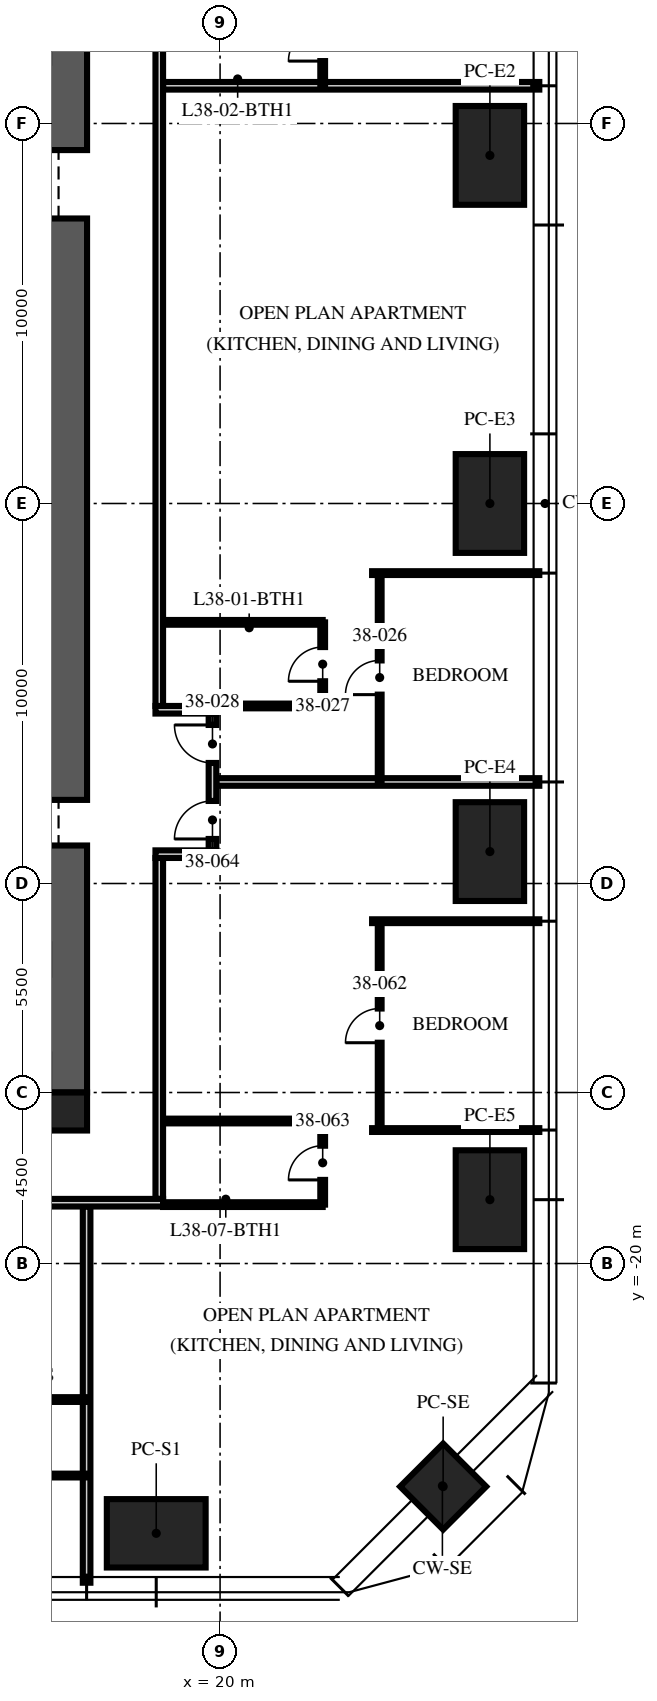
"""IFC4 building model, lengths in metres.
Left out: names, types, materials, properties, quantities, classifications, styles, units other than length and angle.
Written with IfcOpenShell. Run it as: python <this file> out.ifc"""

import sys

from ifc_helpers import new_model, si_unit, direction, frame, frame_2d, origin, origin_2d, place, context, subcontext, project, spatial, rectangle, extrude, element, fill, save


model = new_model("IFC4")
c1 = context("Model", 3, precision=1e-05, world=origin(), true_north=direction((0.0, 1.0)))
c2 = subcontext(c1, "Body", "Model", "MODEL_VIEW")
j1 = project(units=[si_unit("LENGTHUNIT", "METRE"), si_unit("PLANEANGLEUNIT", "RADIAN")], contexts=[c1])
p1 = place(None, origin())
s1 = spatial("IfcSite", under=j1, at=p1, CompositionType="ELEMENT")
p2 = place(p1, origin())
s2 = spatial("IfcBuilding", under=s1, at=p2, CompositionType="ELEMENT")
p3 = place(p2, frame((0.0, 0.0, 152.25)))
s3 = spatial("IfcBuildingStorey", under=s2, at=p3, CompositionType="ELEMENT", Elevation=152.25)
p4 = place(p3, frame((15.5, -15.5, -0.25), z_axis=(0.0, 0.0, 1.0), x_axis=(0.0, 1.0, 0.0)))
e1 = element("IfcWall", 1, at=p4, inside=s3, PredefinedType="SHEAR", context=c2, shape_type="SweptSolid", body=[
    extrude(rectangle(XDim=31.0, YDim=2.0, at=frame_2d((15.5, 0.0))), origin(), (0.0, 0.0, 1.0), 3.75),
])
p5 = place(p4, frame((6.5, 0.0, 0.25)))
e2 = element("IfcOpeningElement", 2, at=p5, cuts=e1, PredefinedType="OPENING", context=c2, shape_type="SweptSolid", body=[
    extrude(rectangle(XDim=1.2, YDim=2.1, at=frame_2d((0.6, 1.05))), frame((0.0, 1.01, 0.0), z_axis=(0.0, -1.0, 0.0), x_axis=(1.0, 0.0, 0.0)), (0.0, 0.0, 1.0), 2.02),
])
p6 = place(p4, frame((23.0, 0.0, 0.25)))
e3 = element("IfcOpeningElement", 3, at=p6, cuts=e1, PredefinedType="OPENING", context=c2, shape_type="SweptSolid", body=[
    extrude(rectangle(XDim=1.8, YDim=2.1, at=frame_2d((0.9, 1.05))), frame((0.0, 1.01, 0.0), z_axis=(0.0, -1.0, 0.0), x_axis=(1.0, 0.0, 0.0)), (0.0, 0.0, 1.0), 2.02),
])
p7 = place(p3, frame((16.0, -16.0, -0.25), z_axis=(0.0, 0.0, 1.0), x_axis=(1.0, 0.0, 0.0)))
e4 = element("IfcColumn", 4, at=p7, inside=s3, PredefinedType="COLUMN", context=c2, shape_type="SweptSolid", body=[
    extrude(rectangle(XDim=1.0, YDim=1.0, at=origin_2d()), origin(), (0.0, 0.0, 1.0), 3.75),
])
for number, where, z_axis, x_axis in (
    (5, (27.1, 9.16, 0.0), (0.0, 0.0, 1.0), (0.0, 1.0, 0.0)),
    (6, (27.1, 0.0, 0.0), (0.0, 0.0, 1.0), (0.0, 1.0, 0.0)),
    (7, (27.1, -9.16, 0.0), (0.0, 0.0, 1.0), (0.0, 1.0, 0.0)),
    (8, (27.1, -18.32, 0.0), (0.0, 0.0, 1.0), (0.0, 1.0, 0.0)),
    (9, (18.32, -27.1, 0.0), (0.0, 0.0, 1.0), (1.0, 0.0, 0.0)),
):
    element("IfcColumn", number, at=place(p3, frame(where, z_axis=z_axis, x_axis=x_axis)), inside=s3, PredefinedType="COLUMN", context=c2, shape_type="SweptSolid", body=[
        extrude(rectangle(XDim=2.6, YDim=1.8, at=origin_2d()), origin(), (0.0, 0.0, 1.0), 3.75),
    ])
p8 = place(p3, frame((25.87, -25.87, 0.0), z_axis=(0.0, 0.0, 1.0), x_axis=(0.707106781187, 0.707106781187, 0.0)))
e10 = element("IfcColumn", 10, at=p8, inside=s3, PredefinedType="COLUMN", context=c2, shape_type="SweptSolid", body=[
    extrude(rectangle(XDim=1.6, YDim=1.6, at=origin_2d()), origin(), (0.0, 0.0, 1.0), 3.75),
])
p9 = place(p3, frame((19.9, -7.328, 0.0), z_axis=(0.0, 0.0, 1.0), x_axis=(1.0, 0.0, 0.0)))
e11 = element("IfcWall", 11, at=p9, inside=s3, PredefinedType="PARTITIONING", context=c2, shape_type="SweptSolid", body=[
    extrude(rectangle(XDim=8.5, YDim=0.2, at=frame_2d((4.25, 0.0))), origin(), (0.0, 0.0, 1.0), 2.81),
])
p10 = place(p3, frame((24.0, -1.832, 0.0), z_axis=(0.0, 0.0, 1.0), x_axis=(1.0, 0.0, 0.0)))
e12 = element("IfcWall", 12, at=p10, inside=s3, PredefinedType="PARTITIONING", context=c2, shape_type="SweptSolid", body=[
    extrude(rectangle(XDim=4.4, YDim=0.1, at=frame_2d((2.2, 0.0))), origin(), (0.0, 0.0, 1.0), 2.81),
])
for number, where, z_axis, x_axis in (
    (13, (18.5, 10.992, 0.0), (0.0, 0.0, 1.0), (1.0, 0.0, 0.0)),
    (14, (16.488, -18.5, 0.0), (0.0, 0.0, 1.0), (0.0, -1.0, 0.0)),
):
    element("IfcWall", number, at=place(p3, frame(where, z_axis=z_axis, x_axis=x_axis)), inside=s3, PredefinedType="PARTITIONING", context=c2, shape_type="SweptSolid", body=[
        extrude(rectangle(XDim=9.9, YDim=0.2, at=frame_2d((4.95, 0.0))), origin(), (0.0, 0.0, 1.0), 2.81),
    ])
for number, where, z_axis, x_axis in (
    (15, (24.0, -16.488, 0.0), (0.0, 0.0, 1.0), (1.0, 0.0, 0.0)),
    (16, (24.0, -10.992, 0.0), (0.0, 0.0, 1.0), (1.0, 0.0, 0.0)),
):
    element("IfcWall", number, at=place(p3, frame(where, z_axis=z_axis, x_axis=x_axis)), inside=s3, PredefinedType="PARTITIONING", context=c2, shape_type="SweptSolid", body=[
        extrude(rectangle(XDim=4.4, YDim=0.1, at=frame_2d((2.2, 0.0))), origin(), (0.0, 0.0, 1.0), 2.81),
    ])
p11 = place(p3, frame((24.2, -7.328, 0.0), z_axis=(0.0, 0.0, 1.0), x_axis=(0.0, 1.0, 0.0)))
e17 = element("IfcWall", 17, at=p11, inside=s3, PredefinedType="PARTITIONING", context=c2, shape_type="SweptSolid", body=[
    extrude(rectangle(XDim=5.496, YDim=0.1, at=frame_2d((2.748, 0.0))), origin(), (0.0, 0.0, 1.0), 2.81),
])
p12 = place(p11, frame((2.298, 0.0, 0.0)))
e18 = element("IfcOpeningElement", 18, at=p12, cuts=e17, PredefinedType="OPENING", context=c2, shape_type="SweptSolid", body=[
    extrude(rectangle(XDim=0.9, YDim=2.1, at=frame_2d((0.45, 1.05))), frame((0.0, 0.06, 0.0), z_axis=(0.0, -1.0, 0.0), x_axis=(1.0, 0.0, 0.0)), (0.0, 0.0, 1.0), 0.12),
])
p13 = place(p3, frame((22.7, -5.328, 0.0), z_axis=(0.0, 0.0, 1.0), x_axis=(0.0, 1.0, 0.0)))
e19 = element("IfcWall", 19, at=p13, inside=s3, PredefinedType="PARTITIONING", context=c2, shape_type="SweptSolid", body=[
    extrude(rectangle(XDim=2.2, YDim=0.125, at=frame_2d((1.1, 0.0))), origin(), (0.0, 0.0, 1.0), 2.81),
])
p14 = place(p13, frame((0.65, 0.0, 0.0)))
e20 = element("IfcOpeningElement", 20, at=p14, cuts=e19, PredefinedType="OPENING", context=c2, shape_type="SweptSolid", body=[
    extrude(rectangle(XDim=0.9, YDim=2.1, at=frame_2d((0.45, 1.05))), frame((0.0, 0.073, 0.0), z_axis=(0.0, -1.0, 0.0), x_axis=(1.0, 0.0, 0.0)), (0.0, 0.0, 1.0), 0.145),
])
p15 = place(p3, frame((19.97, -5.328, 0.0), z_axis=(0.0, 0.0, 1.0), x_axis=(1.0, 0.0, 0.0)))
e21 = element("IfcWall", 21, at=p15, inside=s3, PredefinedType="PARTITIONING", context=c2, shape_type="SweptSolid", body=[
    extrude(rectangle(XDim=2.73, YDim=0.125, at=frame_2d((1.365, 0.0))), origin(), (0.0, 0.0, 1.0), 3.5),
])
p16 = place(p3, frame((18.5, -3.128, 0.0), z_axis=(0.0, 0.0, 1.0), x_axis=(1.0, 0.0, 0.0)))
e22 = element("IfcWall", 22, at=p16, inside=s3, PredefinedType="PARTITIONING", context=c2, shape_type="SweptSolid", body=[
    extrude(rectangle(XDim=4.2, YDim=0.125, at=frame_2d((2.1, 0.0))), origin(), (0.0, 0.0, 1.0), 3.5),
])
p17 = place(p3, frame((22.7, 10.992, 0.0), z_axis=(0.0, 0.0, 1.0), x_axis=(0.0, 1.0, 0.0)))
e23 = element("IfcWall", 23, at=p17, inside=s3, PredefinedType="PARTITIONING", context=c2, shape_type="SweptSolid", body=[
    extrude(rectangle(XDim=2.2, YDim=0.125, at=frame_2d((1.1, 0.0))), origin(), (0.0, 0.0, 1.0), 3.5),
])
p18 = place(p17, frame((0.65, 0.0, 0.0)))
e24 = element("IfcOpeningElement", 24, at=p18, cuts=e23, PredefinedType="OPENING", context=c2, shape_type="SweptSolid", body=[
    extrude(rectangle(XDim=0.9, YDim=2.1, at=frame_2d((0.45, 1.05))), frame((0.0, 0.073, 0.0), z_axis=(0.0, -1.0, 0.0), x_axis=(1.0, 0.0, 0.0)), (0.0, 0.0, 1.0), 0.145),
])
p19 = place(p3, frame((10.992, -25.58, 0.0), z_axis=(0.0, 0.0, 1.0), x_axis=(1.0, 0.0, 0.0)))
e25 = element("IfcWall", 25, at=p19, inside=s3, PredefinedType="PARTITIONING", context=c2, shape_type="SweptSolid", body=[
    extrude(rectangle(XDim=5.496, YDim=0.1, at=frame_2d((2.748, 0.0))), origin(), (0.0, 0.0, 1.0), 2.81),
])
p20 = place(p19, frame((0.15, 0.0, 0.0)))
e26 = element("IfcOpeningElement", 26, at=p20, cuts=e25, PredefinedType="OPENING", context=c2, shape_type="SweptSolid", body=[
    extrude(rectangle(XDim=0.9, YDim=2.1, at=frame_2d((0.45, 1.05))), frame((0.0, 0.06, 0.0), z_axis=(0.0, -1.0, 0.0), x_axis=(1.0, 0.0, 0.0)), (0.0, 0.0, 1.0), 0.12),
])
p21 = place(p19, frame((2.898, 0.0, 0.0)))
e27 = element("IfcOpeningElement", 27, at=p21, cuts=e25, PredefinedType="OPENING", context=c2, shape_type="SweptSolid", body=[
    extrude(rectangle(XDim=0.9, YDim=2.1, at=frame_2d((0.45, 1.05))), frame((0.0, 0.06, 0.0), z_axis=(0.0, -1.0, 0.0), x_axis=(1.0, 0.0, 0.0)), (0.0, 0.0, 1.0), 0.12),
])
p22 = place(p3, frame((12.192, -23.58, 0.0), z_axis=(0.0, 0.0, 1.0), x_axis=(1.0, 0.0, 0.0)))
e28 = element("IfcWall", 28, at=p22, inside=s3, PredefinedType="PARTITIONING", context=c2, shape_type="SweptSolid", body=[
    extrude(rectangle(XDim=4.296, YDim=0.125, at=frame_2d((2.148, 0.0))), origin(), (0.0, 0.0, 1.0), 2.81),
])
p23 = place(p3, frame((24.2, -16.488, 0.0), z_axis=(0.0, 0.0, 1.0), x_axis=(0.0, 1.0, 0.0)))
e29 = element("IfcWall", 29, at=p23, inside=s3, PredefinedType="PARTITIONING", context=c2, shape_type="SweptSolid", body=[
    extrude(rectangle(XDim=5.496, YDim=0.1, at=frame_2d((2.748, 0.0))), origin(), (0.0, 0.0, 1.0), 2.81),
])
p24 = place(p23, frame((2.298, 0.0, 0.0)))
e30 = element("IfcOpeningElement", 30, at=p24, cuts=e29, PredefinedType="OPENING", context=c2, shape_type="SweptSolid", body=[
    extrude(rectangle(XDim=0.9, YDim=2.1, at=frame_2d((0.45, 1.05))), frame((0.0, 0.06, 0.0), z_axis=(0.0, -1.0, 0.0), x_axis=(1.0, 0.0, 0.0)), (0.0, 0.0, 1.0), 0.12),
])
p25 = place(p3, frame((22.7, -18.45, 0.0), z_axis=(0.0, 0.0, 1.0), x_axis=(0.0, 1.0, 0.0)))
e31 = element("IfcWall", 31, at=p25, inside=s3, PredefinedType="PARTITIONING", context=c2, shape_type="SweptSolid", body=[
    extrude(rectangle(XDim=2.2, YDim=0.125, at=frame_2d((1.1, 0.0))), origin(), (0.0, 0.0, 1.0), 2.7),
])
p26 = place(p25, frame((0.65, 0.0, 0.0)))
e32 = element("IfcOpeningElement", 32, at=p26, cuts=e31, PredefinedType="OPENING", context=c2, shape_type="SweptSolid", body=[
    extrude(rectangle(XDim=0.9, YDim=2.1, at=frame_2d((0.45, 1.05))), frame((0.0, 0.073, 0.0), z_axis=(0.0, -1.0, 0.0), x_axis=(1.0, 0.0, 0.0)), (0.0, 0.0, 1.0), 0.145),
])
p27 = place(p3, frame((18.5, -18.45, 0.0), z_axis=(0.0, 0.0, 1.0), x_axis=(1.0, 0.0, 0.0)))
e33 = element("IfcWall", 33, at=p27, inside=s3, PredefinedType="PARTITIONING", context=c2, shape_type="SweptSolid", body=[
    extrude(rectangle(XDim=4.2, YDim=0.125, at=frame_2d((2.1, 0.0))), origin(), (0.0, 0.0, 1.0), 2.3),
])
p28 = place(p3, frame((18.5, -16.25, 0.0), z_axis=(0.0, 0.0, 1.0), x_axis=(1.0, 0.0, 0.0)))
e34 = element("IfcWall", 34, at=p28, inside=s3, PredefinedType="PARTITIONING", context=c2, shape_type="SweptSolid", body=[
    extrude(rectangle(XDim=4.2, YDim=0.125, at=frame_2d((2.1, 0.0))), origin(), (0.0, 0.0, 1.0), 3.5),
])
p29 = place(p3, frame((18.4, -18.3, 0.0), z_axis=(0.0, 0.0, 1.0), x_axis=(0.0, 1.0, 0.0)))
e35 = element("IfcWall", 35, at=p29, inside=s3, PredefinedType="PARTITIONING", context=c2, shape_type="SweptSolid", body=[
    extrude(rectangle(XDim=8.972, YDim=0.2, at=frame_2d((4.486, 0.0))), origin(), (0.0, 0.0, 1.0), 2.3),
])
p30 = place(p3, frame((18.3, -9.228, 0.0), z_axis=(0.0, 0.0, 1.0), x_axis=(1.0, 0.0, 0.0)))
e36 = element("IfcWall", 36, at=p30, inside=s3, PredefinedType="PARTITIONING", context=c2, shape_type="SweptSolid", body=[
    extrude(rectangle(XDim=1.6, YDim=0.2, at=frame_2d((0.8, 0.0))), origin(), (0.0, 0.0, 1.0), 2.7),
])
p31 = place(p3, frame((18.3, -5.428, 0.0), z_axis=(0.0, 0.0, 1.0), x_axis=(1.0, 0.0, 0.0)))
e37 = element("IfcWall", 37, at=p31, inside=s3, PredefinedType="PARTITIONING", context=c2, shape_type="SweptSolid", body=[
    extrude(rectangle(XDim=1.6, YDim=0.2, at=frame_2d((0.8, 0.0))), origin(), (0.0, 0.0, 1.0), 3.5),
])
p32 = place(p3, frame((19.8, -9.128, 0.0), z_axis=(0.0, 0.0, 1.0), x_axis=(0.0, 1.0, 0.0)))
e38 = element("IfcWall", 38, at=p32, inside=s3, PredefinedType="PARTITIONING", context=c2, shape_type="SweptSolid", body=[
    extrude(rectangle(XDim=3.6, YDim=0.2, at=frame_2d((1.8, 0.0))), origin(), (0.0, 0.0, 1.0), 2.7),
])
p33 = place(p32, frame((2.3, 0.0, 0.0)))
e39 = element("IfcOpeningElement", 39, at=p33, cuts=e38, PredefinedType="OPENING", context=c2, shape_type="SweptSolid", body=[
    extrude(rectangle(XDim=1.0, YDim=2.2, at=frame_2d((0.5, 1.1))), frame((0.0, 0.11, 0.0), z_axis=(0.0, -1.0, 0.0), x_axis=(1.0, 0.0, 0.0)), (0.0, 0.0, 1.0), 0.22),
])
p34 = place(p32, frame((0.3, 0.0, 0.0)))
e40 = element("IfcOpeningElement", 40, at=p34, cuts=e38, PredefinedType="OPENING", context=c2, shape_type="SweptSolid", body=[
    extrude(rectangle(XDim=1.0, YDim=2.2, at=frame_2d((0.5, 1.1))), frame((0.0, 0.11, 0.0), z_axis=(0.0, -1.0, 0.0), x_axis=(1.0, 0.0, 0.0)), (0.0, 0.0, 1.0), 0.22),
])
p35 = place(p3, frame((18.4, -5.328, 0.0), z_axis=(0.0, 0.0, 1.0), x_axis=(0.0, 1.0, 0.0)))
e41 = element("IfcWall", 41, at=p35, inside=s3, PredefinedType="PARTITIONING", context=c2, shape_type="SweptSolid", body=[
    extrude(rectangle(XDim=22.028, YDim=0.2, at=frame_2d((11.014, 0.0))), origin(), (0.0, 0.0, 1.0), 2.7),
])
p36 = place(p35, frame((19.84, 0.0, 0.0)))
e42 = element("IfcOpeningElement", 42, at=p36, cuts=e41, PredefinedType="OPENING", context=c2, shape_type="SweptSolid", body=[
    extrude(rectangle(XDim=1.0, YDim=2.2, at=frame_2d((0.5, 1.1))), frame((0.0, 0.11, 0.0), z_axis=(0.0, -1.0, 0.0), x_axis=(1.0, 0.0, 0.0)), (0.0, 0.0, 1.0), 0.22),
])
p37 = place(p3, frame((18.5, -18.4, 0.0), z_axis=(0.0, 0.0, 1.0), x_axis=(-1.0, 0.0, 0.0)))
e43 = element("IfcWall", 43, at=p37, inside=s3, PredefinedType="PARTITIONING", context=c2, shape_type="SweptSolid", body=[
    extrude(rectangle(XDim=12.9, YDim=0.2, at=frame_2d((6.45, 0.0))), origin(), (0.0, 0.0, 1.0), 2.3),
])
p38 = place(p12, origin())
e44 = element("IfcDoor", 44, at=p38, inside=s3, OperationType="SINGLE_SWING_LEFT", PredefinedType="DOOR", context=c2, shape_type="SweptSolid", body=[
    extrude(rectangle(XDim=0.9, YDim=2.1, at=frame_2d((0.45, 1.05))), frame((0.0, 0.025, 0.0), z_axis=(0.0, -1.0, 0.0), x_axis=(1.0, 0.0, 0.0)), (0.0, 0.0, 1.0), 0.05),
])
fill(e18, e44)
p39 = place(p14, origin())
e45 = element("IfcDoor", 45, at=p39, inside=s3, OperationType="SINGLE_SWING_LEFT", PredefinedType="DOOR", context=c2, shape_type="SweptSolid", body=[
    extrude(rectangle(XDim=0.9, YDim=2.1, at=frame_2d((0.45, 1.05))), frame((0.0, 0.025, 0.0), z_axis=(0.0, -1.0, 0.0), x_axis=(1.0, 0.0, 0.0)), (0.0, 0.0, 1.0), 0.05),
])
fill(e20, e45)
p40 = place(p33, origin())
e46 = element("IfcDoor", 46, at=p40, inside=s3, OperationType="SINGLE_SWING_RIGHT", PredefinedType="DOOR", context=c2, shape_type="SweptSolid", body=[
    extrude(rectangle(XDim=1.0, YDim=2.2, at=frame_2d((0.5, 1.1))), frame((0.0, 0.025, 0.0), z_axis=(0.0, -1.0, 0.0), x_axis=(1.0, 0.0, 0.0)), (0.0, 0.0, 1.0), 0.05),
])
fill(e39, e46)
p41 = place(p18, origin())
e47 = element("IfcDoor", 47, at=p41, inside=s3, OperationType="SINGLE_SWING_LEFT", PredefinedType="DOOR", context=c2, shape_type="SweptSolid", body=[
    extrude(rectangle(XDim=0.9, YDim=2.1, at=frame_2d((0.45, 1.05))), frame((0.0, 0.025, 0.0), z_axis=(0.0, -1.0, 0.0), x_axis=(1.0, 0.0, 0.0)), (0.0, 0.0, 1.0), 0.05),
])
fill(e24, e47)
p42 = place(p24, origin())
e48 = element("IfcDoor", 48, at=p42, inside=s3, OperationType="SINGLE_SWING_LEFT", PredefinedType="DOOR", context=c2, shape_type="SweptSolid", body=[
    extrude(rectangle(XDim=0.9, YDim=2.1, at=frame_2d((0.45, 1.05))), frame((0.0, 0.025, 0.0), z_axis=(0.0, -1.0, 0.0), x_axis=(1.0, 0.0, 0.0)), (0.0, 0.0, 1.0), 0.05),
])
fill(e30, e48)
p43 = place(p26, origin())
e49 = element("IfcDoor", 49, at=p43, inside=s3, OperationType="SINGLE_SWING_LEFT", PredefinedType="DOOR", context=c2, shape_type="SweptSolid", body=[
    extrude(rectangle(XDim=0.9, YDim=2.1, at=frame_2d((0.45, 1.05))), frame((0.0, 0.025, 0.0), z_axis=(0.0, -1.0, 0.0), x_axis=(1.0, 0.0, 0.0)), (0.0, 0.0, 1.0), 0.05),
])
fill(e32, e49)
p44 = place(p34, origin())
e50 = element("IfcDoor", 50, at=p44, inside=s3, OperationType="SINGLE_SWING_LEFT", PredefinedType="DOOR", context=c2, shape_type="SweptSolid", body=[
    extrude(rectangle(XDim=1.0, YDim=2.2, at=frame_2d((0.5, 1.1))), frame((0.0, 0.025, 0.0), z_axis=(0.0, -1.0, 0.0), x_axis=(1.0, 0.0, 0.0)), (0.0, 0.0, 1.0), 0.05),
])
fill(e40, e50)
save(model, sys.argv[1])
